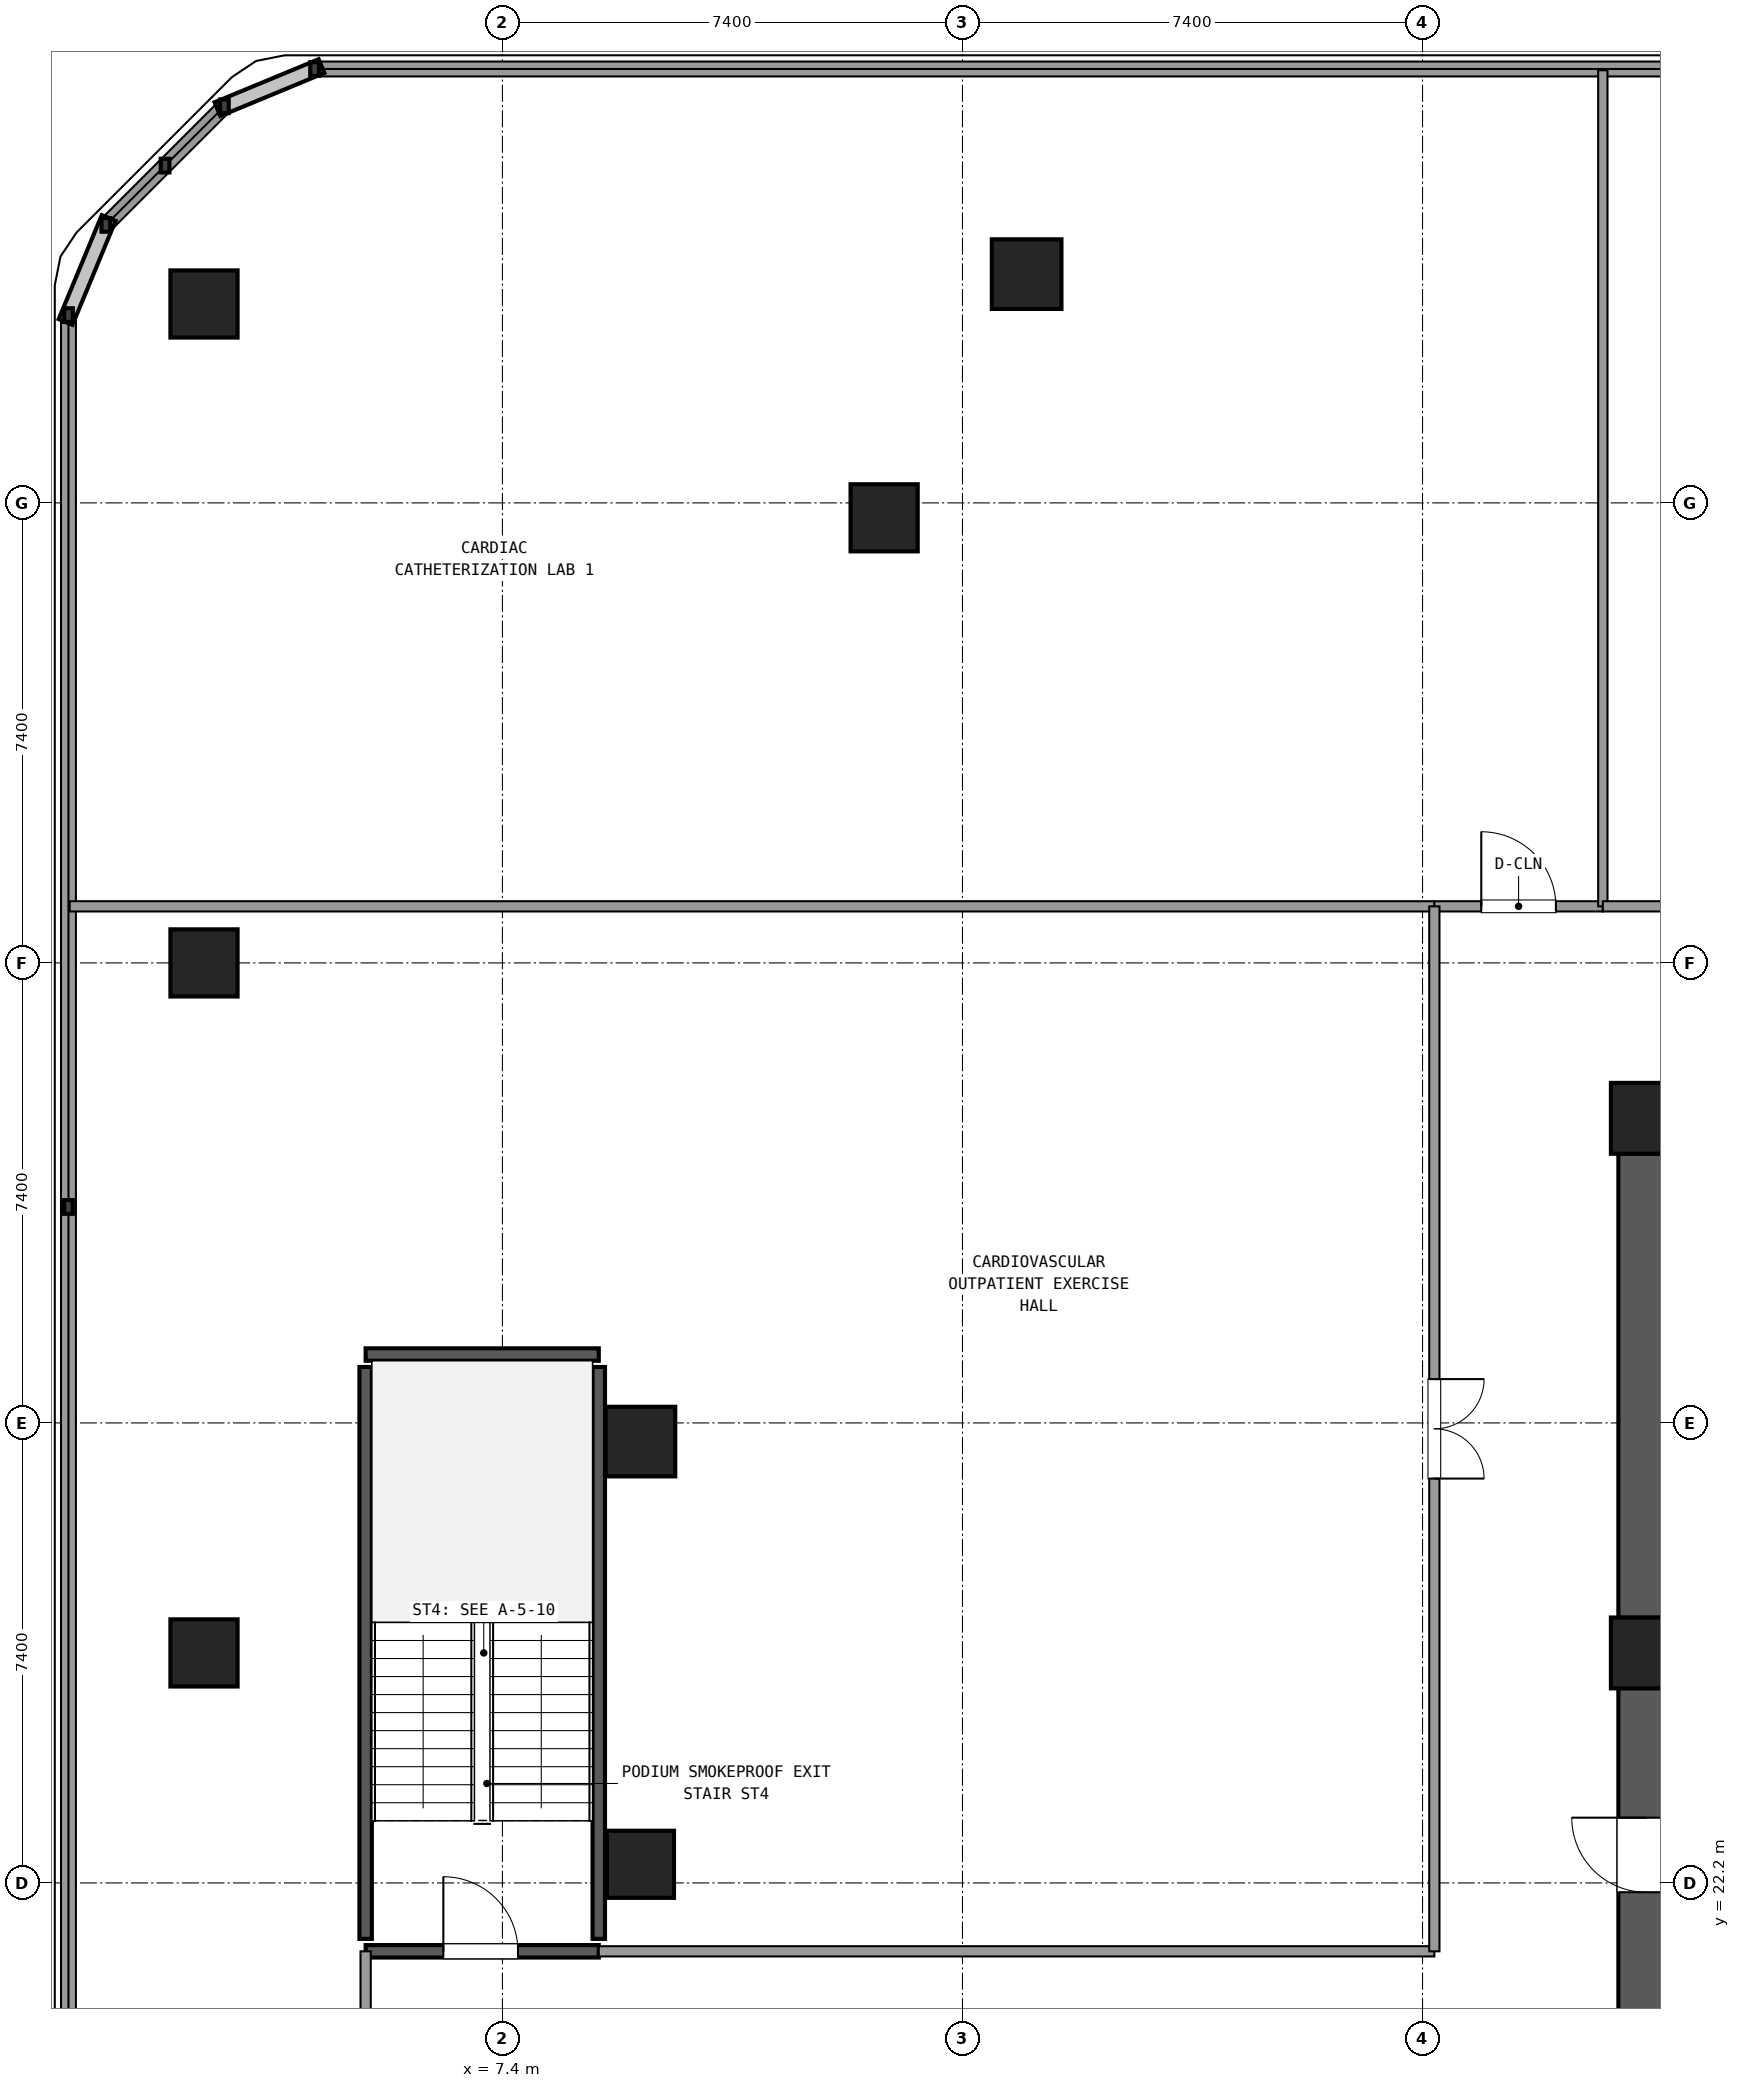
"""IFC4 building model, lengths in metres.
Left out: names, types, materials, properties, quantities, classifications, styles, units other than length and angle.
Written with IfcOpenShell. Run it as: python <this file> out.ifc"""

import sys

from ifc_helpers import new_model, si_unit, direction, frame, frame_2d, origin, origin_2d, place, context, subcontext, project, spatial, rectangle, circle, extrude, element, fill, save


model = new_model("IFC4")
c1 = context("Model", 3, precision=1e-05, world=origin(), true_north=direction((0.0, 1.0)))
c2 = subcontext(c1, "Body", "Model", "MODEL_VIEW")
j1 = project(units=[si_unit("LENGTHUNIT", "METRE"), si_unit("PLANEANGLEUNIT", "RADIAN")], contexts=[c1])
p1 = place(None, origin())
s1 = spatial("IfcSite", under=j1, at=p1, CompositionType="ELEMENT")
p2 = place(p1, origin())
s2 = spatial("IfcBuilding", under=s1, at=p2, CompositionType="ELEMENT")
p3 = place(p2, frame((0.0, 0.0, 14.4)))
s3 = spatial("IfcBuildingStorey", under=s2, at=p3, CompositionType="ELEMENT", Elevation=14.4)
for number, where, z_axis, x_axis in (
    (1, (25.8, 34.5, 0.0), (0.0, 0.0, 1.0), (1.0, 0.0, 0.0)),
    (2, (25.8, 25.9, 0.0), (0.0, 0.0, 1.0), (1.0, 0.0, 0.0)),
):
    element("IfcColumn", number, at=place(p3, frame(where, z_axis=z_axis, x_axis=x_axis)), inside=s3, PredefinedType="COLUMN", context=c2, shape_type="SweptSolid", body=[
        extrude(rectangle(XDim=1.14, YDim=1.14, at=origin_2d()), origin(), (0.0, 0.0, 1.0), 4.5),
    ])
p4 = place(p3, frame((25.8, 33.935, 0.0), z_axis=(0.0, 0.0, 1.0), x_axis=(0.0, -1.0, 0.0)))
e3 = element("IfcWall", 3, at=p4, inside=s3, PredefinedType="SHEAR", context=c2, shape_type="SweptSolid", body=[
    extrude(rectangle(XDim=7.47, YDim=0.9, at=frame_2d((3.735, 0.0))), origin(), (0.0, 0.0, 1.0), 4.2),
])
p5 = place(p3, frame((25.8, 25.335, 0.0), z_axis=(0.0, 0.0, 1.0), x_axis=(0.0, -1.0, 0.0)))
e4 = element("IfcWall", 4, at=p5, inside=s3, PredefinedType="SHEAR", context=c2, shape_type="SweptSolid", body=[
    extrude(rectangle(XDim=7.47, YDim=0.9, at=frame_2d((3.735, 0.0))), origin(), (0.0, 0.0, 1.0), 4.2),
])
p6 = place(p5, frame((2.085, 0.0, 0.0)))
e5 = element("IfcOpeningElement", 5, at=p6, cuts=e4, PredefinedType="OPENING", context=c2, shape_type="SweptSolid", body=[
    extrude(rectangle(XDim=1.2, YDim=2.15, at=frame_2d((0.6, 1.075))), frame((0.0, 0.46, 0.0), z_axis=(0.0, -1.0, 0.0), x_axis=(1.0, 0.0, 0.0)), (0.0, 0.0, 1.0), 0.92),
])
p7 = place(p3, frame((9.62, 22.5, 0.0), z_axis=(0.0, 0.0, 1.0), x_axis=(1.0, 0.0, 0.0)))
e6 = element("IfcColumn", 6, at=p7, inside=s3, PredefinedType="COLUMN", context=c2, shape_type="SweptSolid", body=[
    extrude(rectangle(XDim=1.08, YDim=1.08, at=origin_2d()), origin(), (0.0, 0.0, 1.0), 4.5),
])
p8 = place(p3, frame((15.832, 48.08, 0.0), z_axis=(0.0, 0.0, 1.0), x_axis=(1.0, 0.0, 0.0)))
e7 = element("IfcColumn", 7, at=p8, inside=s3, PredefinedType="COLUMN", context=c2, shape_type="SweptSolid", body=[
    extrude(circle(Radius=0.56, at=origin_2d()), origin(), (0.0, 0.0, 1.0), 4.5),
])
p9 = place(p3, frame((13.54, 44.16, 0.0), z_axis=(0.0, 0.0, 1.0), x_axis=(1.0, 0.0, 0.0)))
e8 = element("IfcColumn", 8, at=p9, inside=s3, PredefinedType="COLUMN", context=c2, shape_type="SweptSolid", body=[
    extrude(rectangle(XDim=1.08, YDim=1.08, at=origin_2d()), origin(), (0.0, 0.0, 1.0), 4.5),
])
p10 = place(p3, frame((9.62, 29.3, 0.0), z_axis=(0.0, 0.0, 1.0), x_axis=(1.0, 0.0, 0.0)))
e9 = element("IfcColumn", 9, at=p10, inside=s3, PredefinedType="COLUMN", context=c2, shape_type="SweptSolid", body=[
    extrude(circle(Radius=0.56, at=origin_2d()), origin(), (0.0, 0.0, 1.0), 4.5),
])
for number, where, z_axis, x_axis in (
    (10, (2.6, 25.9, 0.0), (0.0, 0.0, 1.0), (1.0, 0.0, 0.0)),
    (11, (2.6, 37.0, 0.0), (0.0, 0.0, 1.0), (1.0, 0.0, 0.0)),
    (12, (2.6, 47.6, 0.0), (0.0, 0.0, 1.0), (1.0, 0.0, 0.0)),
):
    element("IfcColumn", number, at=place(p3, frame(where, z_axis=z_axis, x_axis=x_axis)), inside=s3, PredefinedType="COLUMN", context=c2, shape_type="SweptSolid", body=[
        extrude(rectangle(XDim=1.08, YDim=1.08, at=origin_2d()), origin(), (0.0, 0.0, 1.0), 4.5),
    ])
p11 = place(p3, frame((69.621, 51.38, 0.0), z_axis=(0.0, 0.0, 1.0), x_axis=(-1.0, 0.0, 0.0)))
e13 = element("IfcWall", 13, at=p11, inside=s3, PredefinedType="SOLIDWALL", context=c2, shape_type="SweptSolid", body=[
    extrude(rectangle(XDim=65.242, YDim=0.24, at=frame_2d((32.621, 0.0))), origin(), (0.0, 0.0, 1.0), 0.85),
])
p12 = place(p3, frame((2.928, 50.779, 0.0), z_axis=(0.0, 0.0, 1.0), x_axis=(-0.707106781187, -0.707106781187, 0.0)))
e14 = element("IfcWall", 14, at=p12, inside=s3, PredefinedType="SOLIDWALL", context=c2, shape_type="SweptSolid", body=[
    extrude(rectangle(XDim=2.697, YDim=0.24, at=frame_2d((1.348, 0.0))), origin(), (0.0, 0.0, 1.0), 0.85),
])
p13 = place(p3, frame((0.42, 47.421, 0.0), z_axis=(0.0, 0.0, 1.0), x_axis=(0.0, -1.0, 0.0)))
e15 = element("IfcWall", 15, at=p13, inside=s3, PredefinedType="SOLIDWALL", context=c2, shape_type="SweptSolid", body=[
    extrude(rectangle(XDim=43.042, YDim=0.24, at=frame_2d((21.521, 0.0))), origin(), (0.0, 0.0, 1.0), 0.85),
])
p14 = place(p3, frame((5.2, 21.1, 0.0), z_axis=(0.0, 0.0, 1.0), x_axis=(1.0, 0.0, 0.0)))
e16 = element("IfcWall", 16, at=p14, inside=s3, PredefinedType="SHEAR", context=c2, shape_type="SweptSolid", body=[
    extrude(rectangle(XDim=3.75, YDim=0.2, at=frame_2d((1.875, 0.0))), origin(), (0.0, 0.0, 1.0), 4.2),
])
p15 = place(p14, frame((1.25, 0.0, 0.0)))
e17 = element("IfcOpeningElement", 17, at=p15, cuts=e16, PredefinedType="OPENING", context=c2, shape_type="SweptSolid", body=[
    extrude(rectangle(XDim=1.2, YDim=2.15, at=frame_2d((0.6, 1.075))), frame((0.0, 0.11, 0.0), z_axis=(0.0, -1.0, 0.0), x_axis=(1.0, 0.0, 0.0)), (0.0, 0.0, 1.0), 0.22),
])
p16 = place(p3, frame((5.2, 30.7, 0.0), z_axis=(0.0, 0.0, 1.0), x_axis=(1.0, 0.0, 0.0)))
e18 = element("IfcWall", 18, at=p16, inside=s3, PredefinedType="SHEAR", context=c2, shape_type="SweptSolid", body=[
    extrude(rectangle(XDim=3.75, YDim=0.2, at=frame_2d((1.875, 0.0))), origin(), (0.0, 0.0, 1.0), 4.2),
])
for number, where, z_axis, x_axis in (
    (19, (5.2, 21.3, 0.0), (0.0, 0.0, 1.0), (0.0, 1.0, 0.0)),
    (20, (8.95, 21.3, 0.0), (0.0, 0.0, 1.0), (0.0, 1.0, 0.0)),
):
    element("IfcWall", number, at=place(p3, frame(where, z_axis=z_axis, x_axis=x_axis)), inside=s3, PredefinedType="SHEAR", context=c2, shape_type="SweptSolid", body=[
        extrude(rectangle(XDim=9.2, YDim=0.2, at=frame_2d((4.6, 0.0))), origin(), (0.0, 0.0, 1.0), 4.2),
    ])
p17 = place(p3, frame((0.44, 37.91, 0.0), z_axis=(0.0, 0.0, 1.0), x_axis=(1.0, 0.0, 0.0)))
e21 = element("IfcWall", 21, at=p17, inside=s3, PredefinedType="PARTITIONING", context=c2, shape_type="SweptSolid", body=[
    extrude(rectangle(XDim=21.95, YDim=0.165, at=frame_2d((10.975, 0.0))), origin(), (0.0, 0.0, 1.0), 3.21),
])
p18 = place(p3, frame((5.2, 18.17, 0.0), z_axis=(0.0, 0.0, 1.0), x_axis=(0.0, 1.0, 0.0)))
e22 = element("IfcWall", 22, at=p18, inside=s3, PredefinedType="PARTITIONING", context=c2, shape_type="SweptSolid", body=[
    extrude(rectangle(XDim=2.93, YDim=0.165, at=frame_2d((1.465, 0.0))), origin(), (0.0, 0.0, 1.0), 3.21),
])
p19 = place(p3, frame((8.95, 21.1, 0.0), z_axis=(0.0, 0.0, 1.0), x_axis=(1.0, 0.0, 0.0)))
e23 = element("IfcWall", 23, at=p19, inside=s3, PredefinedType="PARTITIONING", context=c2, shape_type="SweptSolid", body=[
    extrude(rectangle(XDim=13.44, YDim=0.165, at=frame_2d((6.72, 0.0))), origin(), (0.0, 0.0, 1.0), 3.21),
])
p20 = place(p3, frame((22.39, 37.91, 0.0), z_axis=(0.0, 0.0, 1.0), x_axis=(1.0, 0.0, 0.0)))
e24 = element("IfcWall", 24, at=p20, inside=s3, PredefinedType="PARTITIONING", context=c2, shape_type="SweptSolid", body=[
    extrude(rectangle(XDim=2.71, YDim=0.165, at=frame_2d((1.355, 0.0))), origin(), (0.0, 0.0, 1.0), 3.21),
])
p21 = place(p20, frame((0.755, 0.0, 0.0)))
e25 = element("IfcOpeningElement", 25, at=p21, cuts=e24, PredefinedType="OPENING", context=c2, shape_type="SweptSolid", body=[
    extrude(rectangle(XDim=1.2, YDim=2.15, at=frame_2d((0.6, 1.075))), frame((0.0, 0.093, 0.0), z_axis=(0.0, -1.0, 0.0), x_axis=(1.0, 0.0, 0.0)), (0.0, 0.0, 1.0), 0.185),
])
p22 = place(p3, frame((25.1, 37.91, 0.0), z_axis=(0.0, 0.0, 1.0), x_axis=(0.0, 1.0, 0.0)))
e26 = element("IfcWall", 26, at=p22, inside=s3, PredefinedType="PARTITIONING", context=c2, shape_type="SweptSolid", body=[
    extrude(rectangle(XDim=13.45, YDim=0.15, at=frame_2d((6.725, 0.0))), origin(), (0.0, 0.0, 1.0), 3.21),
])
p23 = place(p3, frame((25.1, 37.91, 0.0), z_axis=(0.0, 0.0, 1.0), x_axis=(1.0, 0.0, 0.0)))
e27 = element("IfcWall", 27, at=p23, inside=s3, PredefinedType="PARTITIONING", context=c2, shape_type="SweptSolid", body=[
    extrude(rectangle(XDim=5.1, YDim=0.165, at=frame_2d((2.55, 0.0))), origin(), (0.0, 0.0, 1.0), 3.21),
])
p24 = place(p23, frame((1.75, 0.0, 0.0)))
e28 = element("IfcOpeningElement", 28, at=p24, cuts=e27, PredefinedType="OPENING", context=c2, shape_type="SweptSolid", body=[
    extrude(rectangle(XDim=1.6, YDim=2.2, at=frame_2d((0.8, 1.1))), frame((0.0, 0.093, 0.0), z_axis=(0.0, -1.0, 0.0), x_axis=(1.0, 0.0, 0.0)), (0.0, 0.0, 1.0), 0.185),
])
p25 = place(p3, frame((22.39, 21.1, 0.0), z_axis=(0.0, 0.0, 1.0), x_axis=(0.0, 1.0, 0.0)))
e29 = element("IfcWall", 29, at=p25, inside=s3, PredefinedType="PARTITIONING", context=c2, shape_type="SweptSolid", body=[
    extrude(rectangle(XDim=16.81, YDim=0.165, at=frame_2d((8.405, 0.0))), origin(), (0.0, 0.0, 1.0), 3.21),
])
p26 = place(p25, frame((7.605, 0.0, 0.0)))
e30 = element("IfcOpeningElement", 30, at=p26, cuts=e29, PredefinedType="OPENING", context=c2, shape_type="SweptSolid", body=[
    extrude(rectangle(XDim=1.6, YDim=2.2, at=frame_2d((0.8, 1.1))), frame((0.0, 0.093, 0.0), z_axis=(0.0, -1.0, 0.0), x_axis=(1.0, 0.0, 0.0)), (0.0, 0.0, 1.0), 0.185),
])
p27 = place(p6, frame((1.2, 0.0, 0.0), z_axis=(0.0, 0.0, 1.0), x_axis=(-1.0, 0.0, 0.0)))
e31 = element("IfcDoor", 31, at=p27, inside=s3, OperationType="SINGLE_SWING_LEFT", PredefinedType="DOOR", context=c2, shape_type="SweptSolid", body=[
    extrude(rectangle(XDim=1.2, YDim=2.15, at=frame_2d((0.6, 1.075))), frame((0.0, 0.025, 0.0), z_axis=(0.0, -1.0, 0.0), x_axis=(1.0, 0.0, 0.0)), (0.0, 0.0, 1.0), 0.05),
])
fill(e5, e31)
p28 = place(p15, origin())
e32 = element("IfcDoor", 32, at=p28, inside=s3, OperationType="SINGLE_SWING_LEFT", PredefinedType="DOOR", context=c2, shape_type="SweptSolid", body=[
    extrude(rectangle(XDim=1.2, YDim=2.15, at=frame_2d((0.6, 1.075))), frame((0.0, 0.025, 0.0), z_axis=(0.0, -1.0, 0.0), x_axis=(1.0, 0.0, 0.0)), (0.0, 0.0, 1.0), 0.05),
])
fill(e17, e32)
p29 = place(p21, origin())
e33 = element("IfcDoor", 33, at=p29, inside=s3, OperationType="SINGLE_SWING_LEFT", PredefinedType="DOOR", context=c2, shape_type="SweptSolid", body=[
    extrude(rectangle(XDim=1.2, YDim=2.15, at=frame_2d((0.6, 1.075))), frame((0.0, 0.025, 0.0), z_axis=(0.0, -1.0, 0.0), x_axis=(1.0, 0.0, 0.0)), (0.0, 0.0, 1.0), 0.05),
])
fill(e25, e33)
p30 = place(p26, frame((1.6, 0.0, 0.0), z_axis=(0.0, 0.0, 1.0), x_axis=(-1.0, 0.0, 0.0)))
e34 = element("IfcDoor", 34, at=p30, inside=s3, OperationType="DOUBLE_DOOR_SINGLE_SWING", PredefinedType="DOOR", context=c2, shape_type="SweptSolid", body=[
    extrude(rectangle(XDim=1.6, YDim=2.2, at=frame_2d((0.8, 1.1))), frame((0.0, 0.025, 0.0), z_axis=(0.0, -1.0, 0.0), x_axis=(1.0, 0.0, 0.0)), (0.0, 0.0, 1.0), 0.05),
])
fill(e30, e34)
save(model, sys.argv[1])
